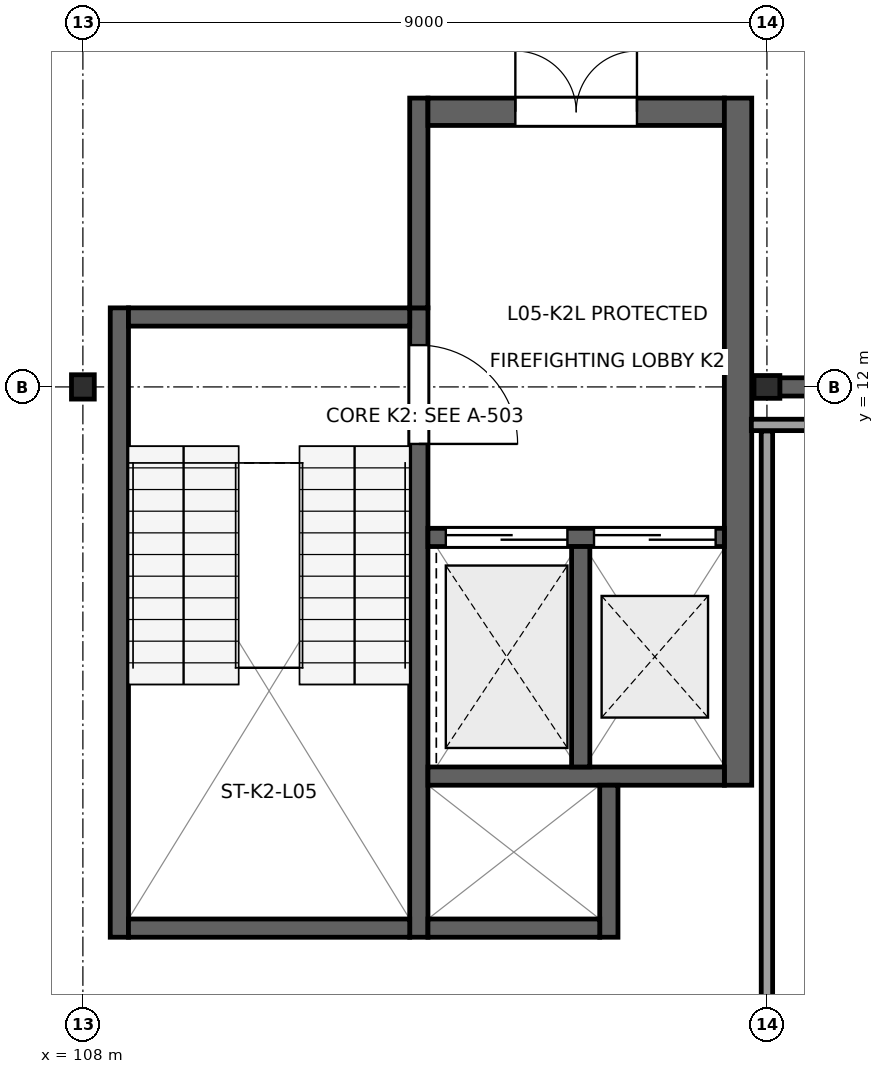
"""IFC4 building model, lengths in metres.
Left out: names, types, materials, properties, quantities, classifications, styles, units other than length and angle.
Written with IfcOpenShell. Run it as: python <this file> out.ifc"""

import sys

from ifc_helpers import new_model, si_unit, direction, frame, frame_2d, origin, origin_2d, place, context, subcontext, project, spatial, rectangle, i_section, extrude, element, fill, save


model = new_model("IFC4")
c1 = context("Model", 3, precision=1e-05, world=origin(), true_north=direction((0.0, 1.0)))
c2 = subcontext(c1, "Body", "Model", "MODEL_VIEW")
j1 = project(units=[si_unit("LENGTHUNIT", "METRE"), si_unit("PLANEANGLEUNIT", "RADIAN")], contexts=[c1])
p1 = place(None, origin())
s1 = spatial("IfcSite", under=j1, at=p1, CompositionType="ELEMENT")
p2 = place(p1, origin())
s2 = spatial("IfcBuilding", under=s1, at=p2, CompositionType="ELEMENT")
p3 = place(p2, frame((0.0, 0.0, 23.4)))
s3 = spatial("IfcBuildingStorey", under=s2, at=p3, CompositionType="ELEMENT", Elevation=23.4)
p4 = place(p3, frame((108.0, 12.0, 0.0), z_axis=(0.0, 0.0, 1.0), x_axis=(1.0, 0.0, 0.0)))
e1 = element("IfcColumn", 1, at=p4, inside=s3, PredefinedType="COLUMN", context=c2, shape_type="SweptSolid", body=[
    extrude(i_section(OverallWidth=0.3, OverallDepth=0.32, WebThickness=0.011, FlangeThickness=0.021, at=origin_2d()), origin(), (0.0, 0.0, 1.0), 4.0),
])
p5 = place(p3, frame((117.0, 12.0, 0.0), z_axis=(0.0, 0.0, 1.0), x_axis=(0.0, 1.0, 0.0)))
e2 = element("IfcColumn", 2, at=p5, inside=s3, PredefinedType="COLUMN", context=c2, shape_type="SweptSolid", body=[
    extrude(i_section(OverallWidth=0.3, OverallDepth=0.34, WebThickness=0.012, FlangeThickness=0.021, at=origin_2d()), origin(), (0.0, 0.0, 1.0), 4.0),
])
p6 = place(p3, frame((108.48, 4.76, 0.0), z_axis=(0.0, 0.0, 1.0), x_axis=(0.0, 1.0, 0.0)))
e3 = element("IfcWall", 3, at=p6, inside=s3, PredefinedType="SHEAR", context=c2, shape_type="SweptSolid", body=[
    extrude(rectangle(XDim=8.28, YDim=0.24, at=frame_2d((4.14, 0.0))), origin(), (0.0, 0.0, 1.0), 3.81),
])
p7 = place(p3, frame((112.42, 4.76, 0.0), z_axis=(0.0, 0.0, 1.0), x_axis=(0.0, 1.0, 0.0)))
e4 = element("IfcWall", 4, at=p7, inside=s3, PredefinedType="SHEAR", context=c2, shape_type="SweptSolid", body=[
    extrude(rectangle(XDim=8.28, YDim=0.24, at=frame_2d((4.14, 0.0))), origin(), (0.0, 0.0, 1.0), 3.81),
])
p8 = place(p7, frame((6.49, 0.0, 0.0)))
e5 = element("IfcOpeningElement", 5, at=p8, cuts=e4, PredefinedType="OPENING", context=c2, shape_type="SweptSolid", body=[
    extrude(rectangle(XDim=1.3, YDim=2.2, at=frame_2d((0.65, 1.1))), frame((0.0, 0.135, 0.0), z_axis=(0.0, -1.0, 0.0), x_axis=(1.0, 0.0, 0.0)), (0.0, 0.0, 1.0), 0.27),
])
for number, where, z_axis, x_axis in (
    (6, (108.6, 4.88, 0.0), (0.0, 0.0, 1.0), (1.0, 0.0, 0.0)),
    (7, (108.6, 12.92, 0.0), (0.0, 0.0, 1.0), (1.0, 0.0, 0.0)),
):
    element("IfcWall", number, at=place(p3, frame(where, z_axis=z_axis, x_axis=x_axis)), inside=s3, PredefinedType="SHEAR", context=c2, shape_type="SweptSolid", body=[
        extrude(rectangle(XDim=3.7, YDim=0.24, at=frame_2d((1.85, 0.0))), origin(), (0.0, 0.0, 1.0), 3.81),
    ])
p9 = place(p3, frame((112.42, 13.04, 0.0), z_axis=(0.0, 0.0, 1.0), x_axis=(0.0, 1.0, 0.0)))
e8 = element("IfcWall", 8, at=p9, inside=s3, PredefinedType="SHEAR", context=c2, shape_type="SweptSolid", body=[
    extrude(rectangle(XDim=2.76, YDim=0.24, at=frame_2d((1.38, 0.0))), origin(), (0.0, 0.0, 1.0), 3.66),
])
p10 = place(p3, frame((112.54, 15.62, 0.0), z_axis=(0.0, 0.0, 1.0), x_axis=(1.0, 0.0, 0.0)))
e9 = element("IfcWall", 9, at=p10, inside=s3, PredefinedType="SHEAR", context=c2, shape_type="SweptSolid", body=[
    extrude(rectangle(XDim=3.9, YDim=0.36, at=frame_2d((1.95, 0.0))), origin(), (0.0, 0.0, 1.0), 3.66),
])
p11 = place(p10, frame((1.15, 0.0, 0.0)))
e10 = element("IfcOpeningElement", 10, at=p11, cuts=e9, PredefinedType="OPENING", context=c2, shape_type="SweptSolid", body=[
    extrude(rectangle(XDim=1.6, YDim=2.25, at=frame_2d((0.8, 1.125))), frame((0.0, 0.195, 0.0), z_axis=(0.0, -1.0, 0.0), x_axis=(1.0, 0.0, 0.0)), (0.0, 0.0, 1.0), 0.39),
])
p12 = place(p3, frame((116.62, 6.76, 0.0), z_axis=(0.0, 0.0, 1.0), x_axis=(0.0, 1.0, 0.0)))
e11 = element("IfcWall", 11, at=p12, inside=s3, PredefinedType="SHEAR", context=c2, shape_type="SweptSolid", body=[
    extrude(rectangle(XDim=9.04, YDim=0.36, at=frame_2d((4.52, 0.0))), origin(), (0.0, 0.0, 1.0), 3.66),
])
p13 = place(p3, frame((112.54, 10.02, 0.0), z_axis=(0.0, 0.0, 1.0), x_axis=(1.0, 0.0, 0.0)))
e12 = element("IfcWall", 12, at=p13, inside=s3, PredefinedType="SHEAR", context=c2, shape_type="SweptSolid", body=[
    extrude(rectangle(XDim=3.9, YDim=0.24, at=frame_2d((1.95, 0.0))), origin(), (0.0, 0.0, 1.0), 3.81),
])
p14 = place(p13, frame((0.235, 0.0, 0.0)))
e13 = element("IfcOpeningElement", 13, at=p14, cuts=e12, PredefinedType="OPENING", context=c2, shape_type="SweptSolid", body=[
    extrude(rectangle(XDim=1.6, YDim=2.3, at=frame_2d((0.8, 1.15))), frame((0.0, 0.135, 0.0), z_axis=(0.0, -1.0, 0.0), x_axis=(1.0, 0.0, 0.0)), (0.0, 0.0, 1.0), 0.27),
])
p15 = place(p13, frame((2.185, 0.0, 0.0)))
e14 = element("IfcOpeningElement", 14, at=p15, cuts=e12, PredefinedType="OPENING", context=c2, shape_type="SweptSolid", body=[
    extrude(rectangle(XDim=1.6, YDim=2.3, at=frame_2d((0.8, 1.15))), frame((0.0, 0.135, 0.0), z_axis=(0.0, -1.0, 0.0), x_axis=(1.0, 0.0, 0.0)), (0.0, 0.0, 1.0), 0.27),
])
p16 = place(p3, frame((112.54, 6.88, 0.0), z_axis=(0.0, 0.0, 1.0), x_axis=(1.0, 0.0, 0.0)))
e15 = element("IfcWall", 15, at=p16, inside=s3, PredefinedType="SHEAR", context=c2, shape_type="SweptSolid", body=[
    extrude(rectangle(XDim=3.9, YDim=0.24, at=frame_2d((1.95, 0.0))), origin(), (0.0, 0.0, 1.0), 3.81),
])
p17 = place(p3, frame((114.55, 7.0, 0.0), z_axis=(0.0, 0.0, 1.0), x_axis=(0.0, 1.0, 0.0)))
e16 = element("IfcWall", 16, at=p17, inside=s3, PredefinedType="SHEAR", context=c2, shape_type="SweptSolid", body=[
    extrude(rectangle(XDim=2.9, YDim=0.24, at=frame_2d((1.45, 0.0))), origin(), (0.0, 0.0, 1.0), 3.81),
])
p18 = place(p3, frame((114.92, 4.76, 0.0), z_axis=(0.0, 0.0, 1.0), x_axis=(0.0, 1.0, 0.0)))
e17 = element("IfcWall", 17, at=p18, inside=s3, PredefinedType="SHEAR", context=c2, shape_type="SweptSolid", body=[
    extrude(rectangle(XDim=2.0, YDim=0.24, at=frame_2d((1.0, 0.0))), origin(), (0.0, 0.0, 1.0), 3.81),
])
p19 = place(p3, frame((112.54, 4.88, 0.0), z_axis=(0.0, 0.0, 1.0), x_axis=(1.0, 0.0, 0.0)))
e18 = element("IfcWall", 18, at=p19, inside=s3, PredefinedType="SHEAR", context=c2, shape_type="SweptSolid", body=[
    extrude(rectangle(XDim=2.26, YDim=0.24, at=frame_2d((1.13, 0.0))), origin(), (0.0, 0.0, 1.0), 3.81),
])
p20 = place(p3, frame((117.168, 12.0, 0.0), z_axis=(0.0, 0.0, 1.0), x_axis=(1.0, 0.0, 0.0)))
e19 = element("IfcWall", 19, at=p20, inside=s3, PredefinedType="SHEAR", context=c2, shape_type="SweptSolid", body=[
    extrude(rectangle(XDim=8.824, YDim=0.24, at=frame_2d((4.412, 0.0))), origin(), (0.0, 0.0, 1.0), 2.845),
])
p21 = place(p3, frame((117.0, 3.655, 0.0), z_axis=(0.0, 0.0, 1.0), x_axis=(0.0, 1.0, 0.0)))
e20 = element("IfcWall", 20, at=p21, inside=s3, PredefinedType="PARTITIONING", context=c2, shape_type="SweptSolid", body=[
    extrude(rectangle(XDim=7.765, YDim=0.15, at=frame_2d((3.882, 0.0))), origin(), (0.0, 0.0, 1.0), 3.365),
])
p22 = place(p3, frame((116.795, 11.5, 0.0), z_axis=(0.0, 0.0, 1.0), x_axis=(1.0, 0.0, 0.0)))
e21 = element("IfcWall", 21, at=p22, inside=s3, PredefinedType="PARTITIONING", context=c2, shape_type="SweptSolid", body=[
    extrude(rectangle(XDim=9.425, YDim=0.15, at=frame_2d((4.712, 0.0))), origin(), (0.0, 0.0, 1.0), 3.64),
])
p23 = place(p8, frame((1.3, 0.0, 0.0), z_axis=(0.0, 0.0, 1.0), x_axis=(-1.0, 0.0, 0.0)))
e22 = element("IfcDoor", 22, at=p23, inside=s3, OperationType="SINGLE_SWING_LEFT", PredefinedType="DOOR", context=c2, shape_type="SweptSolid", body=[
    extrude(rectangle(XDim=1.3, YDim=2.2, at=frame_2d((0.65, 1.1))), frame((0.0, 0.025, 0.0), z_axis=(0.0, -1.0, 0.0), x_axis=(1.0, 0.0, 0.0)), (0.0, 0.0, 1.0), 0.05),
])
fill(e5, e22)
p24 = place(p11, origin())
e23 = element("IfcDoor", 23, at=p24, inside=s3, OperationType="DOUBLE_DOOR_SINGLE_SWING", PredefinedType="DOOR", context=c2, shape_type="SweptSolid", body=[
    extrude(rectangle(XDim=1.6, YDim=2.25, at=frame_2d((0.8, 1.125))), frame((0.0, 0.025, 0.0), z_axis=(0.0, -1.0, 0.0), x_axis=(1.0, 0.0, 0.0)), (0.0, 0.0, 1.0), 0.05),
])
fill(e10, e23)
p25 = place(p14, origin())
e24 = element("IfcDoor", 24, at=p25, inside=s3, OperationType="DOUBLE_DOOR_SLIDING", PredefinedType="DOOR", context=c2, shape_type="SweptSolid", body=[
    extrude(rectangle(XDim=1.6, YDim=2.3, at=frame_2d((0.8, 1.15))), frame((0.0, 0.025, 0.0), z_axis=(0.0, -1.0, 0.0), x_axis=(1.0, 0.0, 0.0)), (0.0, 0.0, 1.0), 0.05),
])
fill(e13, e24)
p26 = place(p15, origin())
e25 = element("IfcDoor", 25, at=p26, inside=s3, OperationType="DOUBLE_DOOR_SLIDING", PredefinedType="DOOR", context=c2, shape_type="SweptSolid", body=[
    extrude(rectangle(XDim=1.6, YDim=2.3, at=frame_2d((0.8, 1.15))), frame((0.0, 0.025, 0.0), z_axis=(0.0, -1.0, 0.0), x_axis=(1.0, 0.0, 0.0)), (0.0, 0.0, 1.0), 0.05),
])
fill(e14, e25)
save(model, sys.argv[1])
